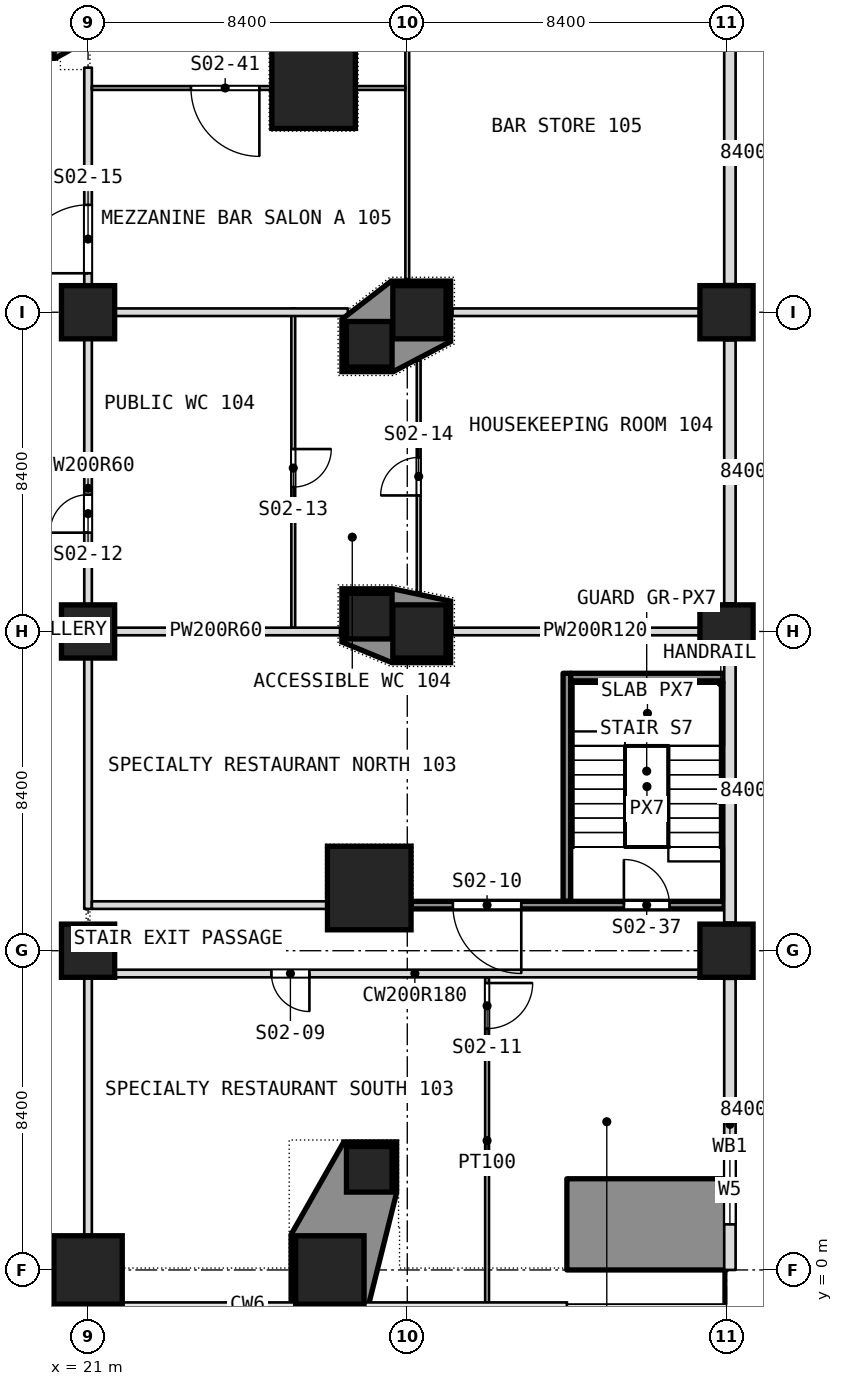
"""IFC4 building model, lengths in metres.
Left out: names, types, materials, properties, quantities, classifications, styles, units other than length and angle.
Written with IfcOpenShell. Run it as: python <this file> out.ifc"""

import sys

from ifc_helpers import new_model, si_unit, direction, frame, frame_2d, origin, origin_2d, place, context, subcontext, project, spatial, polyline, rectangle, outline, extrude, element, fill, save


model = new_model("IFC4")
c1 = context("Model", 3, precision=1e-05, world=origin(), true_north=direction((0.0, 1.0)))
c2 = subcontext(c1, "Body", "Model", "MODEL_VIEW")
j1 = project(units=[si_unit("LENGTHUNIT", "METRE"), si_unit("PLANEANGLEUNIT", "RADIAN")], contexts=[c1])
p1 = place(None, origin())
s1 = spatial("IfcSite", under=j1, at=p1, CompositionType="ELEMENT")
p2 = place(p1, origin())
s2 = spatial("IfcBuilding", under=s1, at=p2, CompositionType="ELEMENT")
p3 = place(p2, frame((0.0, 0.0, 8.0)))
s3 = spatial("IfcBuildingStorey", under=s2, at=p3, CompositionType="ELEMENT", Elevation=8.0)
p4 = place(p3, frame((21.0, 0.0, 0.0), z_axis=(0.0, 0.0, 1.0), x_axis=(1.0, 0.0, 0.0)))
e1 = element("IfcColumn", 1, at=p4, inside=s3, PredefinedType="COLUMN", context=c2, shape_type="SweptSolid", body=[
    extrude(rectangle(XDim=1.8, YDim=1.8, at=origin_2d()), origin(), (0.0, 0.0, 1.0), 5.0),
])
for number, where, z_axis, x_axis in (
    (2, (21.0, 8.4, 0.0), (0.0, 0.0, 1.0), (1.0, 0.0, 0.0)),
    (3, (37.8, 8.4, 0.0), (0.0, 0.0, 1.0), (1.0, 0.0, 0.0)),
    (4, (21.0, 16.8, 0.0), (0.0, 0.0, 1.0), (1.0, 0.0, 0.0)),
    (5, (29.72, 16.8, 0.0), (0.0, 0.0, 1.0), (1.0, 0.0, 0.0)),
    (6, (37.8, 16.8, 0.0), (0.0, 0.0, 1.0), (1.0, 0.0, 0.0)),
    (7, (21.0, 25.2, 0.0), (0.0, 0.0, 1.0), (1.0, 0.0, 0.0)),
    (8, (29.72, 25.2, 0.0), (0.0, 0.0, 1.0), (1.0, 0.0, 0.0)),
    (9, (37.8, 25.2, 0.0), (0.0, 0.0, 1.0), (1.0, 0.0, 0.0)),
):
    element("IfcColumn", number, at=place(p3, frame(where, z_axis=z_axis, x_axis=x_axis)), inside=s3, PredefinedType="COLUMN", context=c2, shape_type="SweptSolid", body=[
        extrude(rectangle(XDim=1.4, YDim=1.4, at=origin_2d()), origin(), (0.0, 0.0, 1.0), 5.0),
    ])
p5 = place(p3, frame((27.363, 0.0, 0.0), z_axis=(0.0, 0.0, 1.0), x_axis=(1.0, 0.0, 0.0)))
e10 = element("IfcColumn", 10, at=p5, inside=s3, PredefinedType="COLUMN", context=c2, shape_type="SweptSolid", body=[
    extrude(rectangle(XDim=1.8, YDim=1.8, at=origin_2d()), origin(), (0.0, 0.0, 1.0), 5.0),
])
for number, where, z_axis, x_axis in (
    (11, (28.4, 10.05, 0.0), (0.0, 0.0, 1.0), (1.0, 0.0, 0.0)),
    (12, (26.936, 31.135, 0.0), (0.0, 0.0, 1.0), (1.0, 0.0, 0.0)),
):
    element("IfcColumn", number, at=place(p3, frame(where, z_axis=z_axis, x_axis=x_axis)), inside=s3, PredefinedType="COLUMN", context=c2, shape_type="SweptSolid", body=[
        extrude(rectangle(XDim=2.2, YDim=2.2, at=origin_2d()), origin(), (0.0, 0.0, 1.0), 5.0),
    ])
p6 = place(p3, frame((33.6, 1.2, 0.0), z_axis=(0.0, 0.0, 1.0), x_axis=(1.0, 0.0, 0.0)))
e13 = element("IfcWall", 13, at=p6, inside=s3, PredefinedType="SOLIDWALL", context=c2, shape_type="SweptSolid", body=[
    extrude(rectangle(XDim=4.2, YDim=2.4, at=frame_2d((2.1, 0.0))), origin(), (0.0, 0.0, 1.0), 5.0),
])
for number, where, z_axis, x_axis in (
    (14, (19.507, 32.6, 0.0), (0.0, 0.0, 1.0), (1.0, 0.0, 0.0)),
    (15, (28.4, 24.356, 0.0), (0.0, 0.0, 1.0), (1.0, 0.0, 0.0)),
    (16, (28.4, 17.203, 0.0), (0.0, 0.0, 1.0), (1.0, 0.0, 0.0)),
    (17, (28.4, 2.649, 0.0), (0.0, 0.0, 1.0), (1.0, 0.0, 0.0)),
):
    element("IfcColumn", number, at=place(p3, frame(where, z_axis=z_axis, x_axis=x_axis)), inside=s3, PredefinedType="COLUMN", context=c2, shape_type="SweptSolid", body=[
        extrude(rectangle(XDim=1.2, YDim=1.2, at=origin_2d()), origin(), (0.0, 0.0, 1.0), 5.0),
    ])
p7 = place(p3, frame((33.6, 9.7, 0.0), z_axis=(0.0, 0.0, 1.0), x_axis=(0.0, 1.0, 0.0)))
e18 = element("IfcWall", 18, at=p7, inside=s3, PredefinedType="PARTITIONING", context=c2, shape_type="SweptSolid", body=[
    extrude(rectangle(XDim=6.0, YDim=0.2, at=frame_2d((3.0, 0.0))), origin(), (0.0, 0.0, 1.0), 4.68),
])
p8 = place(p3, frame((31.5, -0.894, 0.0), z_axis=(0.0, 0.0, 1.0), x_axis=(0.0, 1.0, 0.0)))
e19 = element("IfcWall", 19, at=p8, inside=s3, PredefinedType="PARTITIONING", context=c2, shape_type="SweptSolid", body=[
    extrude(rectangle(XDim=8.594, YDim=0.1, at=frame_2d((4.297, 0.0))), origin(), (0.0, 0.0, 1.0), 4.68),
])
p9 = place(p8, frame((7.244, 0.0, 0.0)))
e20 = element("IfcOpeningElement", 20, at=p9, cuts=e19, PredefinedType="OPENING", context=c2, shape_type="SweptSolid", body=[
    extrude(rectangle(XDim=1.2, YDim=2.1, at=frame_2d((0.6, 1.05))), frame((0.0, 0.05, 0.0), z_axis=(0.0, -1.0, 0.0), x_axis=(1.0, 0.0, 0.0)), (0.0, 0.0, 1.0), 0.1),
])
p10 = place(p3, frame((29.7, 17.828, 0.0), z_axis=(0.0, 0.0, 1.0), x_axis=(0.0, 1.0, 0.0)))
e21 = element("IfcWall", 21, at=p10, inside=s3, PredefinedType="PARTITIONING", context=c2, shape_type="SweptSolid", body=[
    extrude(rectangle(XDim=6.103, YDim=0.1, at=frame_2d((3.052, 0.0))), origin(), (0.0, 0.0, 1.0), 4.68),
])
p11 = place(p10, frame((2.551, 0.0, 0.0)))
e22 = element("IfcOpeningElement", 22, at=p11, cuts=e21, PredefinedType="OPENING", context=c2, shape_type="SweptSolid", body=[
    extrude(rectangle(XDim=1.0, YDim=2.1, at=frame_2d((0.5, 1.05))), frame((0.0, 0.05, 0.0), z_axis=(0.0, -1.0, 0.0), x_axis=(1.0, 0.0, 0.0)), (0.0, 0.0, 1.0), 0.1),
])
p12 = place(p3, frame((29.4, 26.07, 0.0), z_axis=(0.0, 0.0, 1.0), x_axis=(0.0, 1.0, 0.0)))
e23 = element("IfcWall", 23, at=p12, inside=s3, PredefinedType="PARTITIONING", context=c2, shape_type="SweptSolid", body=[
    extrude(rectangle(XDim=16.23, YDim=0.1, at=frame_2d((8.115, 0.0))), origin(), (0.0, 0.0, 1.0), 4.68),
])
p13 = place(p12, frame((8.555, 0.0, 0.0)))
e24 = element("IfcOpeningElement", 24, at=p13, cuts=e23, PredefinedType="OPENING", context=c2, shape_type="SweptSolid", body=[
    extrude(rectangle(XDim=1.0, YDim=2.1, at=frame_2d((0.5, 1.05))), frame((0.0, 0.05, 0.0), z_axis=(0.0, -1.0, 0.0), x_axis=(1.0, 0.0, 0.0)), (0.0, 0.0, 1.0), 0.1),
])
p14 = place(p3, frame((26.4, 16.9, 0.0), z_axis=(0.0, 0.0, 1.0), x_axis=(0.0, 1.0, 0.0)))
e25 = element("IfcWall", 25, at=p14, inside=s3, PredefinedType="PARTITIONING", context=c2, shape_type="SweptSolid", body=[
    extrude(rectangle(XDim=8.4, YDim=0.1, at=frame_2d((4.2, 0.0))), origin(), (0.0, 0.0, 1.0), 4.68),
])
p15 = place(p14, frame((3.7, 0.0, 0.0)))
e26 = element("IfcOpeningElement", 26, at=p15, cuts=e25, PredefinedType="OPENING", context=c2, shape_type="SweptSolid", body=[
    extrude(rectangle(XDim=1.0, YDim=2.1, at=frame_2d((0.5, 1.05))), frame((0.0, 0.05, 0.0), z_axis=(0.0, -1.0, 0.0), x_axis=(1.0, 0.0, 0.0)), (0.0, 0.0, 1.0), 0.1),
])
p16 = place(p3, frame((21.0, -0.894, 0.0), z_axis=(0.0, 0.0, 1.0), x_axis=(0.0, 1.0, 0.0)))
e27 = element("IfcWall", 27, at=p16, inside=s3, PredefinedType="PARTITIONING", context=c2, shape_type="SweptSolid", body=[
    extrude(rectangle(XDim=8.794, YDim=0.2, at=frame_2d((4.397, 0.0))), origin(), (0.0, 0.0, 1.0), 4.68),
])
p17 = place(p3, frame((21.0, 9.5, 0.0), z_axis=(0.0, 0.0, 1.0), x_axis=(0.0, 1.0, 0.0)))
e28 = element("IfcWall", 28, at=p17, inside=s3, PredefinedType="PARTITIONING", context=c2, shape_type="SweptSolid", body=[
    extrude(rectangle(XDim=22.135, YDim=0.2, at=frame_2d((11.067, 0.0))), origin(), (0.0, 0.0, 1.0), 4.68),
])
p18 = place(p17, frame((9.9, 0.0, 0.0)))
e29 = element("IfcOpeningElement", 29, at=p18, cuts=e28, PredefinedType="OPENING", context=c2, shape_type="SweptSolid", body=[
    extrude(rectangle(XDim=1.0, YDim=2.1, at=frame_2d((0.5, 1.05))), frame((0.0, 0.1, 0.0), z_axis=(0.0, -1.0, 0.0), x_axis=(1.0, 0.0, 0.0)), (0.0, 0.0, 1.0), 0.2),
])
p19 = place(p17, frame((16.725, 0.0, 0.0)))
e30 = element("IfcOpeningElement", 30, at=p19, cuts=e28, PredefinedType="OPENING", context=c2, shape_type="SweptSolid", body=[
    extrude(rectangle(XDim=1.8, YDim=2.1, at=frame_2d((0.9, 1.05))), frame((0.0, 0.1, 0.0), z_axis=(0.0, -1.0, 0.0), x_axis=(1.0, 0.0, 0.0)), (0.0, 0.0, 1.0), 0.2),
])
p20 = place(p3, frame((21.1, 7.8, 0.0), z_axis=(0.0, 0.0, 1.0), x_axis=(1.0, 0.0, 0.0)))
e31 = element("IfcWall", 31, at=p20, inside=s3, PredefinedType="PARTITIONING", context=c2, shape_type="SweptSolid", body=[
    extrude(rectangle(XDim=17.0, YDim=0.2, at=frame_2d((8.5, 0.0))), origin(), (0.0, 0.0, 1.0), 4.68),
])
p21 = place(p20, frame((4.725, 0.0, 0.0)))
e32 = element("IfcOpeningElement", 32, at=p21, cuts=e31, PredefinedType="OPENING", context=c2, shape_type="SweptSolid", body=[
    extrude(rectangle(XDim=1.0, YDim=2.1, at=frame_2d((0.5, 1.05))), frame((0.0, 0.1, 0.0), z_axis=(0.0, -1.0, 0.0), x_axis=(1.0, 0.0, 0.0)), (0.0, 0.0, 1.0), 0.2),
])
p22 = place(p3, frame((21.1, 9.6, 0.0), z_axis=(0.0, 0.0, 1.0), x_axis=(1.0, 0.0, 0.0)))
e33 = element("IfcWall", 33, at=p22, inside=s3, PredefinedType="PARTITIONING", context=c2, shape_type="SweptSolid", body=[
    extrude(rectangle(XDim=6.2, YDim=0.2, at=frame_2d((3.1, 0.0))), origin(), (0.0, 0.0, 1.0), 4.68),
])
p23 = place(p3, frame((29.5, 9.6, 0.0), z_axis=(0.0, 0.0, 1.0), x_axis=(1.0, 0.0, 0.0)))
e34 = element("IfcWall", 34, at=p23, inside=s3, PredefinedType="PARTITIONING", context=c2, shape_type="SweptSolid", body=[
    extrude(rectangle(XDim=8.24, YDim=0.2, at=frame_2d((4.12, 0.0))), origin(), (0.0, 0.0, 1.0), 4.68),
])
p24 = place(p23, frame((1.1, 0.0, 0.0)))
e35 = element("IfcOpeningElement", 35, at=p24, cuts=e34, PredefinedType="OPENING", context=c2, shape_type="SweptSolid", body=[
    extrude(rectangle(XDim=1.8, YDim=2.1, at=frame_2d((0.9, 1.05))), frame((0.0, 0.1, 0.0), z_axis=(0.0, -1.0, 0.0), x_axis=(1.0, 0.0, 0.0)), (0.0, 0.0, 1.0), 0.2),
])
p25 = place(p23, frame((5.6, 0.0, 0.0)))
e36 = element("IfcOpeningElement", 36, at=p25, cuts=e34, PredefinedType="OPENING", context=c2, shape_type="SweptSolid", body=[
    extrude(rectangle(XDim=1.2, YDim=2.1, at=frame_2d((0.6, 1.05))), frame((0.0, 0.1, 0.0), z_axis=(0.0, -1.0, 0.0), x_axis=(1.0, 0.0, 0.0)), (0.0, 0.0, 1.0), 0.2),
])
p26 = place(p3, frame((33.7, 15.6, 0.0), z_axis=(0.0, 0.0, 1.0), x_axis=(1.0, 0.0, 0.0)))
e37 = element("IfcWall", 37, at=p26, inside=s3, PredefinedType="PARTITIONING", context=c2, shape_type="SweptSolid", body=[
    extrude(rectangle(XDim=4.04, YDim=0.2, at=frame_2d((2.02, 0.0))), origin(), (0.0, 0.0, 1.0), 4.68),
])
p27 = place(p3, frame((21.1, 16.8, 0.0), z_axis=(0.0, 0.0, 1.0), x_axis=(1.0, 0.0, 0.0)))
e38 = element("IfcWall", 38, at=p27, inside=s3, PredefinedType="PARTITIONING", context=c2, shape_type="SweptSolid", body=[
    extrude(rectangle(XDim=6.53, YDim=0.2, at=frame_2d((3.265, 0.0))), origin(), (0.0, 0.0, 1.0), 4.68),
])
p28 = place(p3, frame((30.59, 16.8, 0.0), z_axis=(0.0, 0.0, 1.0), x_axis=(1.0, 0.0, 0.0)))
e39 = element("IfcWall", 39, at=p28, inside=s3, PredefinedType="PARTITIONING", context=c2, shape_type="SweptSolid", body=[
    extrude(rectangle(XDim=7.51, YDim=0.2, at=frame_2d((3.755, 0.0))), origin(), (0.0, 0.0, 1.0), 4.68),
])
p29 = place(p3, frame((21.1, 25.2, 0.0), z_axis=(0.0, 0.0, 1.0), x_axis=(1.0, 0.0, 0.0)))
e40 = element("IfcWall", 40, at=p29, inside=s3, PredefinedType="PARTITIONING", context=c2, shape_type="SweptSolid", body=[
    extrude(rectangle(XDim=6.737, YDim=0.2, at=frame_2d((3.368, 0.0))), origin(), (0.0, 0.0, 1.0), 4.68),
])
p30 = place(p3, frame((30.59, 25.2, 0.0), z_axis=(0.0, 0.0, 1.0), x_axis=(1.0, 0.0, 0.0)))
e41 = element("IfcWall", 41, at=p30, inside=s3, PredefinedType="PARTITIONING", context=c2, shape_type="SweptSolid", body=[
    extrude(rectangle(XDim=7.51, YDim=0.2, at=frame_2d((3.755, 0.0))), origin(), (0.0, 0.0, 1.0), 4.68),
])
p31 = place(p3, frame((21.1, 31.1, 0.0), z_axis=(0.0, 0.0, 1.0), x_axis=(1.0, 0.0, 0.0)))
e42 = element("IfcWall", 42, at=p31, inside=s3, PredefinedType="PARTITIONING", context=c2, shape_type="SweptSolid", body=[
    extrude(rectangle(XDim=4.716, YDim=0.1, at=frame_2d((2.358, 0.0))), origin(), (0.0, 0.0, 1.0), 4.68),
])
p32 = place(p31, frame((2.608, 0.0, 0.0)))
e43 = element("IfcOpeningElement", 43, at=p32, cuts=e42, PredefinedType="OPENING", context=c2, shape_type="SweptSolid", body=[
    extrude(rectangle(XDim=1.8, YDim=2.1, at=frame_2d((0.9, 1.05))), frame((0.0, 0.05, 0.0), z_axis=(0.0, -1.0, 0.0), x_axis=(1.0, 0.0, 0.0)), (0.0, 0.0, 1.0), 0.1),
])
p33 = place(p3, frame((28.056, 31.1, 0.0), z_axis=(0.0, 0.0, 1.0), x_axis=(1.0, 0.0, 0.0)))
e44 = element("IfcWall", 44, at=p33, inside=s3, PredefinedType="PARTITIONING", context=c2, shape_type="SweptSolid", body=[
    extrude(rectangle(XDim=1.294, YDim=0.1, at=frame_2d((0.647, 0.0))), origin(), (0.0, 0.0, 1.0), 4.68),
])
p34 = place(p3, frame((37.89, 0.0, 0.0), z_axis=(0.0, 0.0, 1.0), x_axis=(0.0, 1.0, 0.0)))
e45 = element("IfcWall", 45, at=p34, inside=s3, PredefinedType="NOTDEFINED", context=c2, shape_type="SweptSolid", body=[
    extrude(rectangle(XDim=7.66, YDim=0.3, at=frame_2d((3.83, 0.0))), origin(), (0.0, 0.0, 1.0), 3.78),
])
p35 = place(p34, frame((1.2, 0.0, 1.2)))
e46 = element("IfcOpeningElement", 46, at=p35, cuts=e45, PredefinedType="OPENING", context=c2, shape_type="SweptSolid", body=[
    extrude(rectangle(XDim=1.8, YDim=2.4, at=frame_2d((0.9, 1.2))), frame((0.0, 0.15, 0.0), z_axis=(0.0, -1.0, 0.0), x_axis=(1.0, 0.0, 0.0)), (0.0, 0.0, 1.0), 0.3),
])
p36 = place(p3, frame((37.89, 9.14, 0.0), z_axis=(0.0, 0.0, 1.0), x_axis=(0.0, 1.0, 0.0)))
e47 = element("IfcWall", 47, at=p36, inside=s3, PredefinedType="NOTDEFINED", context=c2, shape_type="SweptSolid", body=[
    extrude(rectangle(XDim=6.92, YDim=0.3, at=frame_2d((3.46, 0.0))), origin(), (0.0, 0.0, 1.0), 5.0),
])
p37 = place(p3, frame((37.89, 17.54, 0.0), z_axis=(0.0, 0.0, 1.0), x_axis=(0.0, 1.0, 0.0)))
e48 = element("IfcWall", 48, at=p37, inside=s3, PredefinedType="NOTDEFINED", context=c2, shape_type="SweptSolid", body=[
    extrude(rectangle(XDim=6.92, YDim=0.3, at=frame_2d((3.46, 0.0))), origin(), (0.0, 0.0, 1.0), 3.78),
])
p38 = place(p3, frame((37.89, 25.94, 0.0), z_axis=(0.0, 0.0, 1.0), x_axis=(0.0, 1.0, 0.0)))
e49 = element("IfcWall", 49, at=p38, inside=s3, PredefinedType="NOTDEFINED", context=c2, shape_type="SweptSolid", body=[
    extrude(rectangle(XDim=6.92, YDim=0.3, at=frame_2d((3.46, 0.0))), origin(), (0.0, 0.0, 1.0), 3.78),
])
p39 = place(p3, origin())
e50 = element("IfcWall", 50, at=p39, inside=s3, PredefinedType="SOLIDWALL", context=c2, shape_type="SweptSolid", body=[
    extrude(outline(polyline([(20.258, 34.42), (21.82, 34.42), (21.82, 32.83), (20.138, 31.88), (18.787, 31.88), (18.787, 33.258), (20.258, 34.42)]), holes=[polyline([(21.7, 32.9), (21.7, 34.3), (20.3, 34.3), (20.3, 32.9), (21.7, 32.9)]), polyline([(20.107, 32.0), (20.107, 33.2), (18.907, 33.2), (18.907, 32.0), (20.107, 32.0)])]), origin(), (0.0, 0.0, 1.0), 5.0),
])
p40 = place(p3, origin())
e51 = element("IfcWall", 51, at=p40, inside=s3, PredefinedType="SOLIDWALL", context=c2, shape_type="SweptSolid", body=[
    extrude(outline(polyline([(27.68, 25.015), (28.979, 26.02), (30.54, 26.02), (30.54, 24.427), (29.03, 23.636), (27.68, 23.636), (27.68, 25.015)]), holes=[polyline([(29.02, 24.5), (30.42, 24.5), (30.42, 25.9), (29.02, 25.9), (29.02, 24.5)]), polyline([(27.8, 23.756), (29.0, 23.756), (29.0, 24.956), (27.8, 24.956), (27.8, 23.756)])]), origin(), (0.0, 0.0, 1.0), 5.0),
])
p41 = place(p3, origin())
e52 = element("IfcWall", 52, at=p41, inside=s3, PredefinedType="SOLIDWALL", context=c2, shape_type="SweptSolid", body=[
    extrude(outline(polyline([(27.68, 16.523), (27.68, 17.923), (29.013, 17.923), (30.54, 17.597), (30.54, 15.98), (28.996, 15.98), (27.68, 16.523)]), holes=[polyline([(29.02, 16.1), (30.42, 16.1), (30.42, 17.5), (29.02, 17.5), (29.02, 16.1)]), polyline([(27.8, 16.603), (29.0, 16.603), (29.0, 17.803), (27.8, 17.803), (27.8, 16.603)])]), origin(), (0.0, 0.0, 1.0), 5.0),
])
p42 = place(p3, origin())
e53 = element("IfcWall", 53, at=p42, inside=s3, PredefinedType="SOLIDWALL", context=c2, shape_type="SweptSolid", body=[
    extrude(outline(polyline([(26.343, 0.932), (27.73, 3.369), (29.12, 3.369), (29.12, 2.034), (28.357, -1.02), (26.343, -1.02), (26.343, 0.932)]), holes=[polyline([(27.8, 2.049), (29.0, 2.049), (29.0, 3.249), (27.8, 3.249), (27.8, 2.049)]), polyline([(26.463, -0.9), (28.263, -0.9), (28.263, 0.9), (26.463, 0.9), (26.463, -0.9)])]), origin(), (0.0, 0.0, 1.0), 5.0),
])
p43 = place(p9, origin())
e54 = element("IfcDoor", 54, at=p43, inside=s3, OperationType="SINGLE_SWING_LEFT", PredefinedType="DOOR", context=c2, shape_type="SweptSolid", body=[
    extrude(rectangle(XDim=1.2, YDim=2.1, at=frame_2d((0.6, 1.05))), frame((0.0, 0.025, 0.0), z_axis=(0.0, -1.0, 0.0), x_axis=(1.0, 0.0, 0.0)), (0.0, 0.0, 1.0), 0.05),
])
fill(e20, e54)
p44 = place(p11, origin())
e55 = element("IfcDoor", 55, at=p44, inside=s3, OperationType="SINGLE_SWING_LEFT", PredefinedType="DOOR", context=c2, shape_type="SweptSolid", body=[
    extrude(rectangle(XDim=1.0, YDim=2.1, at=frame_2d((0.5, 1.05))), frame((0.0, 0.025, 0.0), z_axis=(0.0, -1.0, 0.0), x_axis=(1.0, 0.0, 0.0)), (0.0, 0.0, 1.0), 0.05),
])
fill(e22, e55)
p45 = place(p15, origin())
e56 = element("IfcDoor", 56, at=p45, inside=s3, OperationType="SINGLE_SWING_LEFT", PredefinedType="DOOR", context=c2, shape_type="SweptSolid", body=[
    extrude(rectangle(XDim=1.0, YDim=2.1, at=frame_2d((0.5, 1.05))), frame((0.0, 0.025, 0.0), z_axis=(0.0, -1.0, 0.0), x_axis=(1.0, 0.0, 0.0)), (0.0, 0.0, 1.0), 0.05),
])
fill(e26, e56)
p46 = place(p18, origin())
e57 = element("IfcDoor", 57, at=p46, inside=s3, OperationType="SINGLE_SWING_RIGHT", PredefinedType="DOOR", context=c2, shape_type="SweptSolid", body=[
    extrude(rectangle(XDim=1.0, YDim=2.1, at=frame_2d((0.5, 1.05))), frame((0.0, 0.025, 0.0), z_axis=(0.0, -1.0, 0.0), x_axis=(1.0, 0.0, 0.0)), (0.0, 0.0, 1.0), 0.05),
])
fill(e29, e57)
p47 = place(p19, origin())
e58 = element("IfcDoor", 58, at=p47, inside=s3, OperationType="DOUBLE_DOOR_SINGLE_SWING", PredefinedType="DOOR", context=c2, shape_type="SweptSolid", body=[
    extrude(rectangle(XDim=1.8, YDim=2.1, at=frame_2d((0.9, 1.05))), frame((0.0, 0.025, 0.0), z_axis=(0.0, -1.0, 0.0), x_axis=(1.0, 0.0, 0.0)), (0.0, 0.0, 1.0), 0.05),
])
fill(e30, e58)
p48 = place(p21, origin())
e59 = element("IfcDoor", 59, at=p48, inside=s3, OperationType="SINGLE_SWING_RIGHT", PredefinedType="DOOR", context=c2, shape_type="SweptSolid", body=[
    extrude(rectangle(XDim=1.0, YDim=2.1, at=frame_2d((0.5, 1.05))), frame((0.0, 0.025, 0.0), z_axis=(0.0, -1.0, 0.0), x_axis=(1.0, 0.0, 0.0)), (0.0, 0.0, 1.0), 0.05),
])
fill(e32, e59)
p49 = place(p24, origin())
e60 = element("IfcDoor", 60, at=p49, inside=s3, OperationType="DOUBLE_DOOR_SINGLE_SWING", PredefinedType="DOOR", context=c2, shape_type="SweptSolid", body=[
    extrude(rectangle(XDim=1.8, YDim=2.1, at=frame_2d((0.9, 1.05))), frame((0.0, 0.025, 0.0), z_axis=(0.0, -1.0, 0.0), x_axis=(1.0, 0.0, 0.0)), (0.0, 0.0, 1.0), 0.05),
])
fill(e35, e60)
p50 = place(p25, origin())
e61 = element("IfcDoor", 61, at=p50, inside=s3, OperationType="SINGLE_SWING_LEFT", PredefinedType="DOOR", context=c2, shape_type="SweptSolid", body=[
    extrude(rectangle(XDim=1.2, YDim=2.1, at=frame_2d((0.6, 1.05))), frame((0.0, 0.025, 0.0), z_axis=(0.0, -1.0, 0.0), x_axis=(1.0, 0.0, 0.0)), (0.0, 0.0, 1.0), 0.05),
])
fill(e36, e61)
p51 = place(p32, origin())
e62 = element("IfcDoor", 62, at=p51, inside=s3, OperationType="DOUBLE_DOOR_SINGLE_SWING", PredefinedType="DOOR", context=c2, shape_type="SweptSolid", body=[
    extrude(rectangle(XDim=1.8, YDim=2.1, at=frame_2d((0.9, 1.05))), frame((0.0, 0.025, 0.0), z_axis=(0.0, -1.0, 0.0), x_axis=(1.0, 0.0, 0.0)), (0.0, 0.0, 1.0), 0.05),
])
fill(e43, e62)
p52 = place(p35, origin())
e63 = element("IfcWindow", 63, at=p52, inside=s3, PartitioningType="SINGLE_PANEL", PredefinedType="WINDOW", context=c2, shape_type="SweptSolid", body=[
    extrude(rectangle(XDim=1.8, YDim=2.4, at=frame_2d((0.9, 1.2))), frame((0.0, 0.03, 0.0), z_axis=(0.0, -1.0, 0.0), x_axis=(1.0, 0.0, 0.0)), (0.0, 0.0, 1.0), 0.06),
])
fill(e46, e63)
save(model, sys.argv[1])
